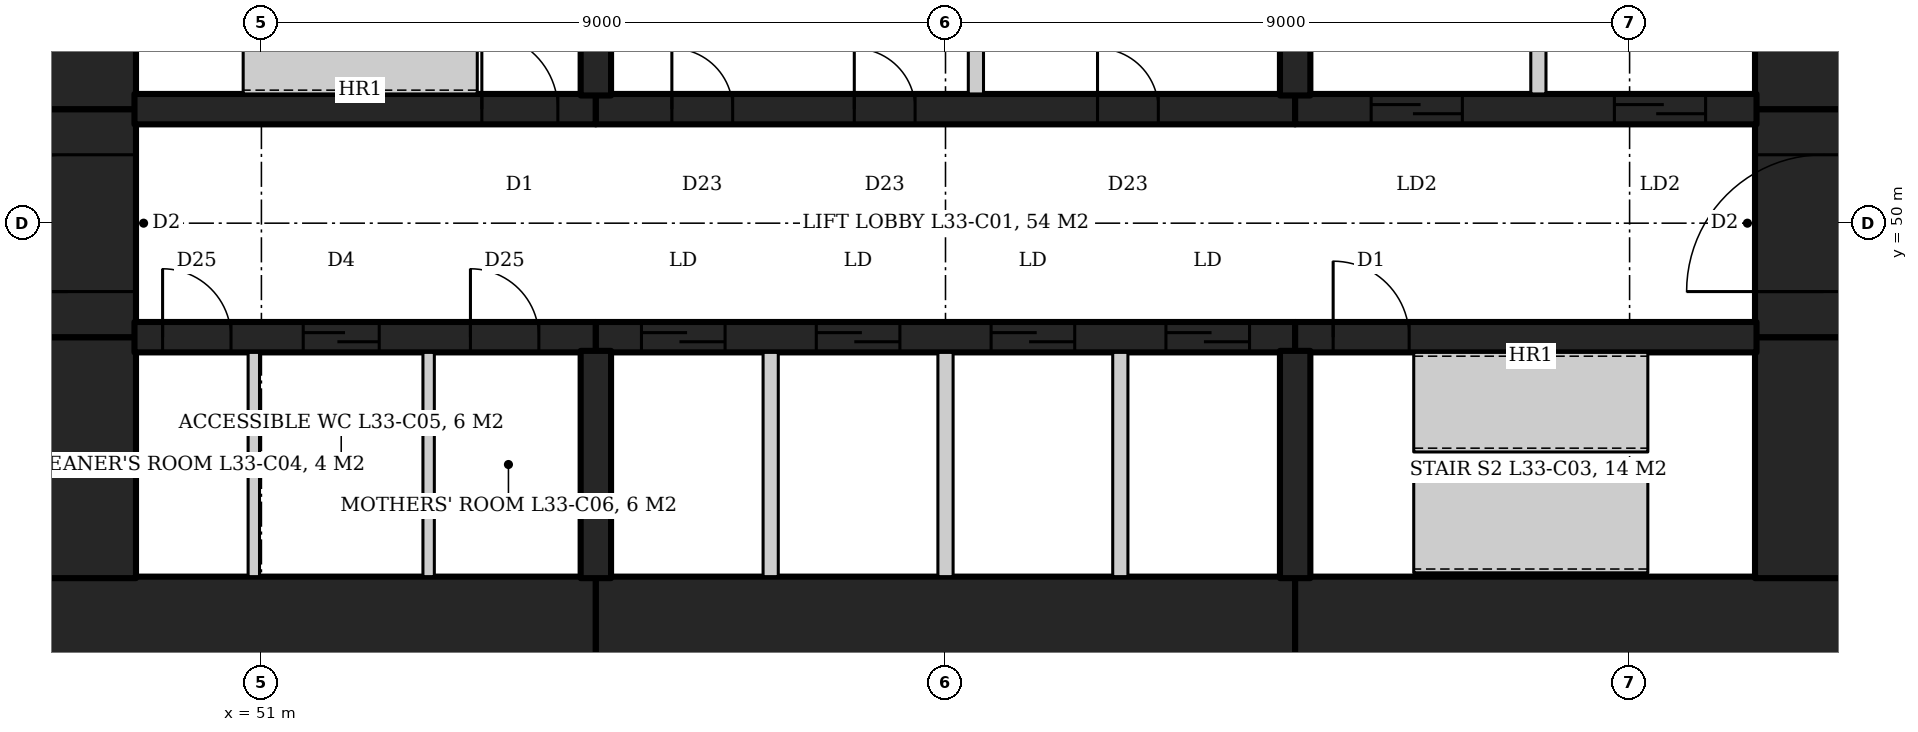
"""IFC4 building model, lengths in metres.
Left out: names, types, materials, properties, quantities, classifications, styles, units other than length and angle.
Written with IfcOpenShell. Run it as: python <this file> out.ifc"""

import sys

from ifc_helpers import new_model, si_unit, direction, frame, frame_2d, origin, place, context, subcontext, project, spatial, rectangle, extrude, element, fill, save


model = new_model("IFC4")
c1 = context("Model", 3, precision=1e-05, world=origin(), true_north=direction((0.0, 1.0)))
c2 = subcontext(c1, "Body", "Model", "MODEL_VIEW")
j1 = project(units=[si_unit("LENGTHUNIT", "METRE"), si_unit("PLANEANGLEUNIT", "RADIAN")], contexts=[c1])
p1 = place(None, origin())
s1 = spatial("IfcSite", under=j1, at=p1, CompositionType="ELEMENT")
p2 = place(p1, origin())
s2 = spatial("IfcBuilding", under=s1, at=p2, CompositionType="ELEMENT")
p3 = place(p2, frame((0.0, 0.0, 147.8)))
s3 = spatial("IfcBuildingStorey", under=s2, at=p3, CompositionType="ELEMENT", Elevation=147.8)
p4 = place(p3, frame((47.55, 44.45, 0.0), z_axis=(0.0, 0.0, 1.0), x_axis=(1.0, 0.0, 0.0)))
e1 = element("IfcWall", 1, at=p4, inside=s3, PredefinedType="SHEAR", context=c2, shape_type="SweptSolid", body=[
    extrude(rectangle(XDim=7.85, YDim=1.8, at=frame_2d((3.925, 0.0))), origin(), (0.0, 0.0, 1.0), 4.2),
])
p5 = place(p3, frame((55.4, 44.45, 0.0), z_axis=(0.0, 0.0, 1.0), x_axis=(1.0, 0.0, 0.0)))
e2 = element("IfcWall", 2, at=p5, inside=s3, PredefinedType="SHEAR", context=c2, shape_type="SweptSolid", body=[
    extrude(rectangle(XDim=9.2, YDim=1.8, at=frame_2d((4.6, 0.0))), origin(), (0.0, 0.0, 1.0), 4.2),
])
p6 = place(p3, frame((64.6, 44.45, 0.0), z_axis=(0.0, 0.0, 1.0), x_axis=(1.0, 0.0, 0.0)))
e3 = element("IfcWall", 3, at=p6, inside=s3, PredefinedType="SHEAR", context=c2, shape_type="SweptSolid", body=[
    extrude(rectangle(XDim=7.85, YDim=1.8, at=frame_2d((3.925, 0.0))), origin(), (0.0, 0.0, 1.0), 4.2),
])
p7 = place(p3, frame((71.55, 45.33, 0.0), z_axis=(0.0, 0.0, 1.0), x_axis=(0.0, 1.0, 0.0)))
e4 = element("IfcWall", 4, at=p7, inside=s3, PredefinedType="SHEAR", context=c2, shape_type="SweptSolid", body=[
    extrude(rectangle(XDim=3.17, YDim=1.8, at=frame_2d((1.585, 0.0))), origin(), (0.0, 0.0, 1.0), 4.2),
])
p8 = place(p3, frame((71.55, 48.5, 0.0), z_axis=(0.0, 0.0, 1.0), x_axis=(0.0, 1.0, 0.0)))
e5 = element("IfcWall", 5, at=p8, inside=s3, PredefinedType="SHEAR", context=c2, shape_type="SweptSolid", body=[
    extrude(rectangle(XDim=3.0, YDim=1.8, at=frame_2d((1.5, 0.0))), origin(), (0.0, 0.0, 1.0), 4.2),
])
p9 = place(p8, frame((0.6, 0.0, 0.0)))
e6 = element("IfcOpeningElement", 6, at=p9, cuts=e5, PredefinedType="OPENING", context=c2, shape_type="SweptSolid", body=[
    extrude(rectangle(XDim=1.8, YDim=2.1, at=frame_2d((0.9, 1.05))), frame((0.0, 0.91, 0.0), z_axis=(0.0, -1.0, 0.0), x_axis=(1.0, 0.0, 0.0)), (0.0, 0.0, 1.0), 1.82),
])
for number, where, z_axis, x_axis in (
    (7, (71.55, 51.5, 0.0), (0.0, 0.0, 1.0), (0.0, 1.0, 0.0)),
    (8, (48.45, 45.33, 0.0), (0.0, 0.0, 1.0), (0.0, 1.0, 0.0)),
):
    element("IfcWall", number, at=place(p3, frame(where, z_axis=z_axis, x_axis=x_axis)), inside=s3, PredefinedType="SHEAR", context=c2, shape_type="SweptSolid", body=[
        extrude(rectangle(XDim=3.17, YDim=1.8, at=frame_2d((1.585, 0.0))), origin(), (0.0, 0.0, 1.0), 4.2),
    ])
p10 = place(p3, frame((48.45, 48.5, 0.0), z_axis=(0.0, 0.0, 1.0), x_axis=(0.0, 1.0, 0.0)))
e9 = element("IfcWall", 9, at=p10, inside=s3, PredefinedType="SHEAR", context=c2, shape_type="SweptSolid", body=[
    extrude(rectangle(XDim=3.0, YDim=1.8, at=frame_2d((1.5, 0.0))), origin(), (0.0, 0.0, 1.0), 4.2),
])
p11 = place(p10, frame((0.6, 0.0, 0.0)))
e10 = element("IfcOpeningElement", 10, at=p11, cuts=e9, PredefinedType="OPENING", context=c2, shape_type="SweptSolid", body=[
    extrude(rectangle(XDim=1.8, YDim=2.1, at=frame_2d((0.9, 1.05))), frame((0.0, 0.91, 0.0), z_axis=(0.0, -1.0, 0.0), x_axis=(1.0, 0.0, 0.0)), (0.0, 0.0, 1.0), 1.82),
])
p12 = place(p3, frame((48.45, 51.5, 0.0), z_axis=(0.0, 0.0, 1.0), x_axis=(0.0, 1.0, 0.0)))
e11 = element("IfcWall", 11, at=p12, inside=s3, PredefinedType="SHEAR", context=c2, shape_type="SweptSolid", body=[
    extrude(rectangle(XDim=3.17, YDim=1.8, at=frame_2d((1.585, 0.0))), origin(), (0.0, 0.0, 1.0), 4.2),
])
p13 = place(p3, frame((49.33, 51.5, 0.0), z_axis=(0.0, 0.0, 1.0), x_axis=(1.0, 0.0, 0.0)))
e12 = element("IfcWall", 12, at=p13, inside=s3, PredefinedType="SHEAR", context=c2, shape_type="SweptSolid", body=[
    extrude(rectangle(XDim=6.07, YDim=0.4, at=frame_2d((3.035, 0.0))), origin(), (0.0, 0.0, 1.0), 4.2),
])
p14 = place(p13, frame((4.57, 0.0, 0.0)))
e13 = element("IfcOpeningElement", 13, at=p14, cuts=e12, PredefinedType="OPENING", context=c2, shape_type="SweptSolid", body=[
    extrude(rectangle(XDim=1.0, YDim=2.1, at=frame_2d((0.5, 1.05))), frame((0.0, 0.21, 0.0), z_axis=(0.0, -1.0, 0.0), x_axis=(1.0, 0.0, 0.0)), (0.0, 0.0, 1.0), 0.42),
])
p15 = place(p3, frame((55.4, 51.5, 0.0), z_axis=(0.0, 0.0, 1.0), x_axis=(1.0, 0.0, 0.0)))
e14 = element("IfcWall", 14, at=p15, inside=s3, PredefinedType="SHEAR", context=c2, shape_type="SweptSolid", body=[
    extrude(rectangle(XDim=9.2, YDim=0.4, at=frame_2d((4.6, 0.0))), origin(), (0.0, 0.0, 1.0), 4.2),
])
p16 = place(p15, frame((1.0, 0.0, 0.0)))
e15 = element("IfcOpeningElement", 15, at=p16, cuts=e14, PredefinedType="OPENING", context=c2, shape_type="SweptSolid", body=[
    extrude(rectangle(XDim=0.8, YDim=2.1, at=frame_2d((0.4, 1.05))), frame((0.0, 0.21, 0.0), z_axis=(0.0, -1.0, 0.0), x_axis=(1.0, 0.0, 0.0)), (0.0, 0.0, 1.0), 0.42),
])
p17 = place(p15, frame((3.4, 0.0, 0.0)))
e16 = element("IfcOpeningElement", 16, at=p17, cuts=e14, PredefinedType="OPENING", context=c2, shape_type="SweptSolid", body=[
    extrude(rectangle(XDim=0.8, YDim=2.1, at=frame_2d((0.4, 1.05))), frame((0.0, 0.21, 0.0), z_axis=(0.0, -1.0, 0.0), x_axis=(1.0, 0.0, 0.0)), (0.0, 0.0, 1.0), 0.42),
])
p18 = place(p15, frame((6.6, 0.0, 0.0)))
e17 = element("IfcOpeningElement", 17, at=p18, cuts=e14, PredefinedType="OPENING", context=c2, shape_type="SweptSolid", body=[
    extrude(rectangle(XDim=0.8, YDim=2.1, at=frame_2d((0.4, 1.05))), frame((0.0, 0.21, 0.0), z_axis=(0.0, -1.0, 0.0), x_axis=(1.0, 0.0, 0.0)), (0.0, 0.0, 1.0), 0.42),
])
p19 = place(p3, frame((64.6, 51.5, 0.0), z_axis=(0.0, 0.0, 1.0), x_axis=(1.0, 0.0, 0.0)))
e18 = element("IfcWall", 18, at=p19, inside=s3, PredefinedType="SHEAR", context=c2, shape_type="SweptSolid", body=[
    extrude(rectangle(XDim=6.07, YDim=0.4, at=frame_2d((3.035, 0.0))), origin(), (0.0, 0.0, 1.0), 4.2),
])
p20 = place(p19, frame((1.0, 0.0, 0.0)))
e19 = element("IfcOpeningElement", 19, at=p20, cuts=e18, PredefinedType="OPENING", context=c2, shape_type="SweptSolid", body=[
    extrude(rectangle(XDim=1.2, YDim=2.1, at=frame_2d((0.6, 1.05))), frame((0.0, 0.21, 0.0), z_axis=(0.0, -1.0, 0.0), x_axis=(1.0, 0.0, 0.0)), (0.0, 0.0, 1.0), 0.42),
])
p21 = place(p19, frame((4.2, 0.0, 0.0)))
e20 = element("IfcOpeningElement", 20, at=p21, cuts=e18, PredefinedType="OPENING", context=c2, shape_type="SweptSolid", body=[
    extrude(rectangle(XDim=1.2, YDim=2.1, at=frame_2d((0.6, 1.05))), frame((0.0, 0.21, 0.0), z_axis=(0.0, -1.0, 0.0), x_axis=(1.0, 0.0, 0.0)), (0.0, 0.0, 1.0), 0.42),
])
p22 = place(p3, frame((49.33, 48.5, 0.0), z_axis=(0.0, 0.0, 1.0), x_axis=(1.0, 0.0, 0.0)))
e21 = element("IfcWall", 21, at=p22, inside=s3, PredefinedType="SHEAR", context=c2, shape_type="SweptSolid", body=[
    extrude(rectangle(XDim=6.07, YDim=0.4, at=frame_2d((3.035, 0.0))), origin(), (0.0, 0.0, 1.0), 4.2),
])
p23 = place(p22, frame((0.37, 0.0, 0.0)))
e22 = element("IfcOpeningElement", 22, at=p23, cuts=e21, PredefinedType="OPENING", context=c2, shape_type="SweptSolid", body=[
    extrude(rectangle(XDim=0.9, YDim=2.1, at=frame_2d((0.45, 1.05))), frame((0.0, 0.21, 0.0), z_axis=(0.0, -1.0, 0.0), x_axis=(1.0, 0.0, 0.0)), (0.0, 0.0, 1.0), 0.42),
])
p24 = place(p22, frame((2.22, 0.0, 0.0)))
e23 = element("IfcOpeningElement", 23, at=p24, cuts=e21, PredefinedType="OPENING", context=c2, shape_type="SweptSolid", body=[
    extrude(rectangle(XDim=1.0, YDim=2.1, at=frame_2d((0.5, 1.05))), frame((0.0, 0.21, 0.0), z_axis=(0.0, -1.0, 0.0), x_axis=(1.0, 0.0, 0.0)), (0.0, 0.0, 1.0), 0.42),
])
p25 = place(p22, frame((4.42, 0.0, 0.0)))
e24 = element("IfcOpeningElement", 24, at=p25, cuts=e21, PredefinedType="OPENING", context=c2, shape_type="SweptSolid", body=[
    extrude(rectangle(XDim=0.9, YDim=2.1, at=frame_2d((0.45, 1.05))), frame((0.0, 0.21, 0.0), z_axis=(0.0, -1.0, 0.0), x_axis=(1.0, 0.0, 0.0)), (0.0, 0.0, 1.0), 0.42),
])
p26 = place(p3, frame((55.4, 48.5, 0.0), z_axis=(0.0, 0.0, 1.0), x_axis=(1.0, 0.0, 0.0)))
e25 = element("IfcWall", 25, at=p26, inside=s3, PredefinedType="SHEAR", context=c2, shape_type="SweptSolid", body=[
    extrude(rectangle(XDim=9.2, YDim=0.4, at=frame_2d((4.6, 0.0))), origin(), (0.0, 0.0, 1.0), 4.2),
])
p27 = place(p26, frame((0.6, 0.0, 0.0)))
e26 = element("IfcOpeningElement", 26, at=p27, cuts=e25, PredefinedType="OPENING", context=c2, shape_type="SweptSolid", body=[
    extrude(rectangle(XDim=1.1, YDim=2.1, at=frame_2d((0.55, 1.05))), frame((0.0, 0.21, 0.0), z_axis=(0.0, -1.0, 0.0), x_axis=(1.0, 0.0, 0.0)), (0.0, 0.0, 1.0), 0.42),
])
p28 = place(p26, frame((2.9, 0.0, 0.0)))
e27 = element("IfcOpeningElement", 27, at=p28, cuts=e25, PredefinedType="OPENING", context=c2, shape_type="SweptSolid", body=[
    extrude(rectangle(XDim=1.1, YDim=2.1, at=frame_2d((0.55, 1.05))), frame((0.0, 0.21, 0.0), z_axis=(0.0, -1.0, 0.0), x_axis=(1.0, 0.0, 0.0)), (0.0, 0.0, 1.0), 0.42),
])
p29 = place(p26, frame((5.2, 0.0, 0.0)))
e28 = element("IfcOpeningElement", 28, at=p29, cuts=e25, PredefinedType="OPENING", context=c2, shape_type="SweptSolid", body=[
    extrude(rectangle(XDim=1.1, YDim=2.1, at=frame_2d((0.55, 1.05))), frame((0.0, 0.21, 0.0), z_axis=(0.0, -1.0, 0.0), x_axis=(1.0, 0.0, 0.0)), (0.0, 0.0, 1.0), 0.42),
])
p30 = place(p26, frame((7.5, 0.0, 0.0)))
e29 = element("IfcOpeningElement", 29, at=p30, cuts=e25, PredefinedType="OPENING", context=c2, shape_type="SweptSolid", body=[
    extrude(rectangle(XDim=1.1, YDim=2.1, at=frame_2d((0.55, 1.05))), frame((0.0, 0.21, 0.0), z_axis=(0.0, -1.0, 0.0), x_axis=(1.0, 0.0, 0.0)), (0.0, 0.0, 1.0), 0.42),
])
p31 = place(p3, frame((64.6, 48.5, 0.0), z_axis=(0.0, 0.0, 1.0), x_axis=(1.0, 0.0, 0.0)))
e30 = element("IfcWall", 30, at=p31, inside=s3, PredefinedType="SHEAR", context=c2, shape_type="SweptSolid", body=[
    extrude(rectangle(XDim=6.07, YDim=0.4, at=frame_2d((3.035, 0.0))), origin(), (0.0, 0.0, 1.0), 4.2),
])
p32 = place(p31, frame((0.5, 0.0, 0.0)))
e31 = element("IfcOpeningElement", 31, at=p32, cuts=e30, PredefinedType="OPENING", context=c2, shape_type="SweptSolid", body=[
    extrude(rectangle(XDim=1.0, YDim=2.1, at=frame_2d((0.5, 1.05))), frame((0.0, 0.21, 0.0), z_axis=(0.0, -1.0, 0.0), x_axis=(1.0, 0.0, 0.0)), (0.0, 0.0, 1.0), 0.42),
])
for number, where, z_axis, x_axis in (
    (32, (55.4, 51.68, 0.0), (0.0, 0.0, 1.0), (0.0, 1.0, 0.0)),
    (33, (64.6, 51.68, 0.0), (0.0, 0.0, 1.0), (0.0, 1.0, 0.0)),
    (34, (55.4, 48.32, 0.0), (0.0, 0.0, 1.0), (0.0, -1.0, 0.0)),
    (35, (64.6, 48.32, 0.0), (0.0, 0.0, 1.0), (0.0, -1.0, 0.0)),
):
    element("IfcWall", number, at=place(p3, frame(where, z_axis=z_axis, x_axis=x_axis)), inside=s3, PredefinedType="SHEAR", context=c2, shape_type="SweptSolid", body=[
        extrude(rectangle(XDim=2.99, YDim=0.4, at=frame_2d((1.495, 0.0))), origin(), (0.0, 0.0, 1.0), 4.2),
    ])
for number, where, z_axis, x_axis in (
    (36, (57.7, 45.35, 0.0), (0.0, 0.0, 1.0), (0.0, 1.0, 0.0)),
    (37, (60.0, 45.35, 0.0), (0.0, 0.0, 1.0), (0.0, 1.0, 0.0)),
    (38, (62.3, 45.35, 0.0), (0.0, 0.0, 1.0), (0.0, 1.0, 0.0)),
    (39, (67.8, 51.7, 0.0), (0.0, 0.0, 1.0), (0.0, 1.0, 0.0)),
):
    element("IfcWall", number, at=place(p3, frame(where, z_axis=z_axis, x_axis=x_axis)), inside=s3, PredefinedType="PARTITIONING", context=c2, shape_type="SweptSolid", body=[
        extrude(rectangle(XDim=2.95, YDim=0.2, at=frame_2d((1.475, 0.0))), origin(), (0.0, 0.0, 1.0), 4.2),
    ])
for number, where, z_axis, x_axis in (
    (40, (50.9, 45.35, 0.0), (0.0, 0.0, 1.0), (0.0, 1.0, 0.0)),
    (41, (53.2, 45.35, 0.0), (0.0, 0.0, 1.0), (0.0, 1.0, 0.0)),
):
    element("IfcWall", number, at=place(p3, frame(where, z_axis=z_axis, x_axis=x_axis)), inside=s3, PredefinedType="PARTITIONING", context=c2, shape_type="SweptSolid", body=[
        extrude(rectangle(XDim=2.95, YDim=0.15, at=frame_2d((1.475, 0.0))), origin(), (0.0, 0.0, 1.0), 4.04),
    ])
p33 = place(p3, frame((60.4, 51.7, 0.0), z_axis=(0.0, 0.0, 1.0), x_axis=(0.0, 1.0, 0.0)))
e42 = element("IfcWall", 42, at=p33, inside=s3, PredefinedType="PARTITIONING", context=c2, shape_type="SweptSolid", body=[
    extrude(rectangle(XDim=2.95, YDim=0.2, at=frame_2d((1.475, 0.0))), origin(), (0.0, 0.0, 1.0), 4.04),
])
p34 = place(p14, origin())
e43 = element("IfcDoor", 43, at=p34, inside=s3, OperationType="SINGLE_SWING_LEFT", PredefinedType="DOOR", context=c2, shape_type="SweptSolid", body=[
    extrude(rectangle(XDim=1.0, YDim=2.1, at=frame_2d((0.5, 1.05))), frame((0.0, 0.025, 0.0), z_axis=(0.0, -1.0, 0.0), x_axis=(1.0, 0.0, 0.0)), (0.0, 0.0, 1.0), 0.05),
])
fill(e13, e43)
p35 = place(p32, origin())
e44 = element("IfcDoor", 44, at=p35, inside=s3, OperationType="SINGLE_SWING_LEFT", PredefinedType="DOOR", context=c2, shape_type="SweptSolid", body=[
    extrude(rectangle(XDim=1.0, YDim=2.1, at=frame_2d((0.5, 1.05))), frame((0.0, 0.025, 0.0), z_axis=(0.0, -1.0, 0.0), x_axis=(1.0, 0.0, 0.0)), (0.0, 0.0, 1.0), 0.05),
])
fill(e31, e44)
p36 = place(p20, origin())
e45 = element("IfcDoor", 45, at=p36, inside=s3, OperationType="SLIDING_TO_LEFT", PredefinedType="DOOR", context=c2, shape_type="SweptSolid", body=[
    extrude(rectangle(XDim=1.2, YDim=2.1, at=frame_2d((0.6, 1.05))), frame((0.0, 0.025, 0.0), z_axis=(0.0, -1.0, 0.0), x_axis=(1.0, 0.0, 0.0)), (0.0, 0.0, 1.0), 0.05),
])
fill(e19, e45)
p37 = place(p21, origin())
e46 = element("IfcDoor", 46, at=p37, inside=s3, OperationType="SLIDING_TO_LEFT", PredefinedType="DOOR", context=c2, shape_type="SweptSolid", body=[
    extrude(rectangle(XDim=1.2, YDim=2.1, at=frame_2d((0.6, 1.05))), frame((0.0, 0.025, 0.0), z_axis=(0.0, -1.0, 0.0), x_axis=(1.0, 0.0, 0.0)), (0.0, 0.0, 1.0), 0.05),
])
fill(e20, e46)
p38 = place(p27, origin())
e47 = element("IfcDoor", 47, at=p38, inside=s3, OperationType="SLIDING_TO_LEFT", PredefinedType="DOOR", context=c2, shape_type="SweptSolid", body=[
    extrude(rectangle(XDim=1.1, YDim=2.1, at=frame_2d((0.55, 1.05))), frame((0.0, 0.025, 0.0), z_axis=(0.0, -1.0, 0.0), x_axis=(1.0, 0.0, 0.0)), (0.0, 0.0, 1.0), 0.05),
])
fill(e26, e47)
p39 = place(p28, origin())
e48 = element("IfcDoor", 48, at=p39, inside=s3, OperationType="SLIDING_TO_LEFT", PredefinedType="DOOR", context=c2, shape_type="SweptSolid", body=[
    extrude(rectangle(XDim=1.1, YDim=2.1, at=frame_2d((0.55, 1.05))), frame((0.0, 0.025, 0.0), z_axis=(0.0, -1.0, 0.0), x_axis=(1.0, 0.0, 0.0)), (0.0, 0.0, 1.0), 0.05),
])
fill(e27, e48)
p40 = place(p29, origin())
e49 = element("IfcDoor", 49, at=p40, inside=s3, OperationType="SLIDING_TO_LEFT", PredefinedType="DOOR", context=c2, shape_type="SweptSolid", body=[
    extrude(rectangle(XDim=1.1, YDim=2.1, at=frame_2d((0.55, 1.05))), frame((0.0, 0.025, 0.0), z_axis=(0.0, -1.0, 0.0), x_axis=(1.0, 0.0, 0.0)), (0.0, 0.0, 1.0), 0.05),
])
fill(e28, e49)
p41 = place(p30, origin())
e50 = element("IfcDoor", 50, at=p41, inside=s3, OperationType="SLIDING_TO_LEFT", PredefinedType="DOOR", context=c2, shape_type="SweptSolid", body=[
    extrude(rectangle(XDim=1.1, YDim=2.1, at=frame_2d((0.55, 1.05))), frame((0.0, 0.025, 0.0), z_axis=(0.0, -1.0, 0.0), x_axis=(1.0, 0.0, 0.0)), (0.0, 0.0, 1.0), 0.05),
])
fill(e29, e50)
p42 = place(p23, origin())
e51 = element("IfcDoor", 51, at=p42, inside=s3, OperationType="SINGLE_SWING_RIGHT", PredefinedType="DOOR", context=c2, shape_type="SweptSolid", body=[
    extrude(rectangle(XDim=0.9, YDim=2.1, at=frame_2d((0.45, 1.05))), frame((0.0, 0.025, 0.0), z_axis=(0.0, -1.0, 0.0), x_axis=(1.0, 0.0, 0.0)), (0.0, 0.0, 1.0), 0.05),
])
fill(e22, e51)
p43 = place(p24, origin())
e52 = element("IfcDoor", 52, at=p43, inside=s3, OperationType="SLIDING_TO_LEFT", PredefinedType="DOOR", context=c2, shape_type="SweptSolid", body=[
    extrude(rectangle(XDim=1.0, YDim=2.1, at=frame_2d((0.5, 1.05))), frame((0.0, 0.025, 0.0), z_axis=(0.0, -1.0, 0.0), x_axis=(1.0, 0.0, 0.0)), (0.0, 0.0, 1.0), 0.05),
])
fill(e23, e52)
p44 = place(p25, origin())
e53 = element("IfcDoor", 53, at=p44, inside=s3, OperationType="SINGLE_SWING_RIGHT", PredefinedType="DOOR", context=c2, shape_type="SweptSolid", body=[
    extrude(rectangle(XDim=0.9, YDim=2.1, at=frame_2d((0.45, 1.05))), frame((0.0, 0.025, 0.0), z_axis=(0.0, -1.0, 0.0), x_axis=(1.0, 0.0, 0.0)), (0.0, 0.0, 1.0), 0.05),
])
fill(e24, e53)
p45 = place(p9, origin())
e54 = element("IfcDoor", 54, at=p45, inside=s3, OperationType="DOUBLE_DOOR_DOUBLE_SWING", PredefinedType="DOOR", context=c2, shape_type="SweptSolid", body=[
    extrude(rectangle(XDim=1.8, YDim=2.1, at=frame_2d((0.9, 1.05))), frame((0.0, 0.025, 0.0), z_axis=(0.0, -1.0, 0.0), x_axis=(1.0, 0.0, 0.0)), (0.0, 0.0, 1.0), 0.05),
])
fill(e6, e54)
p46 = place(p11, origin())
e55 = element("IfcDoor", 55, at=p46, inside=s3, OperationType="DOUBLE_DOOR_DOUBLE_SWING", PredefinedType="DOOR", context=c2, shape_type="SweptSolid", body=[
    extrude(rectangle(XDim=1.8, YDim=2.1, at=frame_2d((0.9, 1.05))), frame((0.0, 0.025, 0.0), z_axis=(0.0, -1.0, 0.0), x_axis=(1.0, 0.0, 0.0)), (0.0, 0.0, 1.0), 0.05),
])
fill(e10, e55)
p47 = place(p16, origin())
e56 = element("IfcDoor", 56, at=p47, inside=s3, OperationType="SINGLE_SWING_LEFT", PredefinedType="DOOR", context=c2, shape_type="SweptSolid", body=[
    extrude(rectangle(XDim=0.8, YDim=2.1, at=frame_2d((0.4, 1.05))), frame((0.0, 0.025, 0.0), z_axis=(0.0, -1.0, 0.0), x_axis=(1.0, 0.0, 0.0)), (0.0, 0.0, 1.0), 0.05),
])
fill(e15, e56)
p48 = place(p17, origin())
e57 = element("IfcDoor", 57, at=p48, inside=s3, OperationType="SINGLE_SWING_LEFT", PredefinedType="DOOR", context=c2, shape_type="SweptSolid", body=[
    extrude(rectangle(XDim=0.8, YDim=2.1, at=frame_2d((0.4, 1.05))), frame((0.0, 0.025, 0.0), z_axis=(0.0, -1.0, 0.0), x_axis=(1.0, 0.0, 0.0)), (0.0, 0.0, 1.0), 0.05),
])
fill(e16, e57)
p49 = place(p18, origin())
e58 = element("IfcDoor", 58, at=p49, inside=s3, OperationType="SINGLE_SWING_LEFT", PredefinedType="DOOR", context=c2, shape_type="SweptSolid", body=[
    extrude(rectangle(XDim=0.8, YDim=2.1, at=frame_2d((0.4, 1.05))), frame((0.0, 0.025, 0.0), z_axis=(0.0, -1.0, 0.0), x_axis=(1.0, 0.0, 0.0)), (0.0, 0.0, 1.0), 0.05),
])
fill(e17, e58)
save(model, sys.argv[1])
